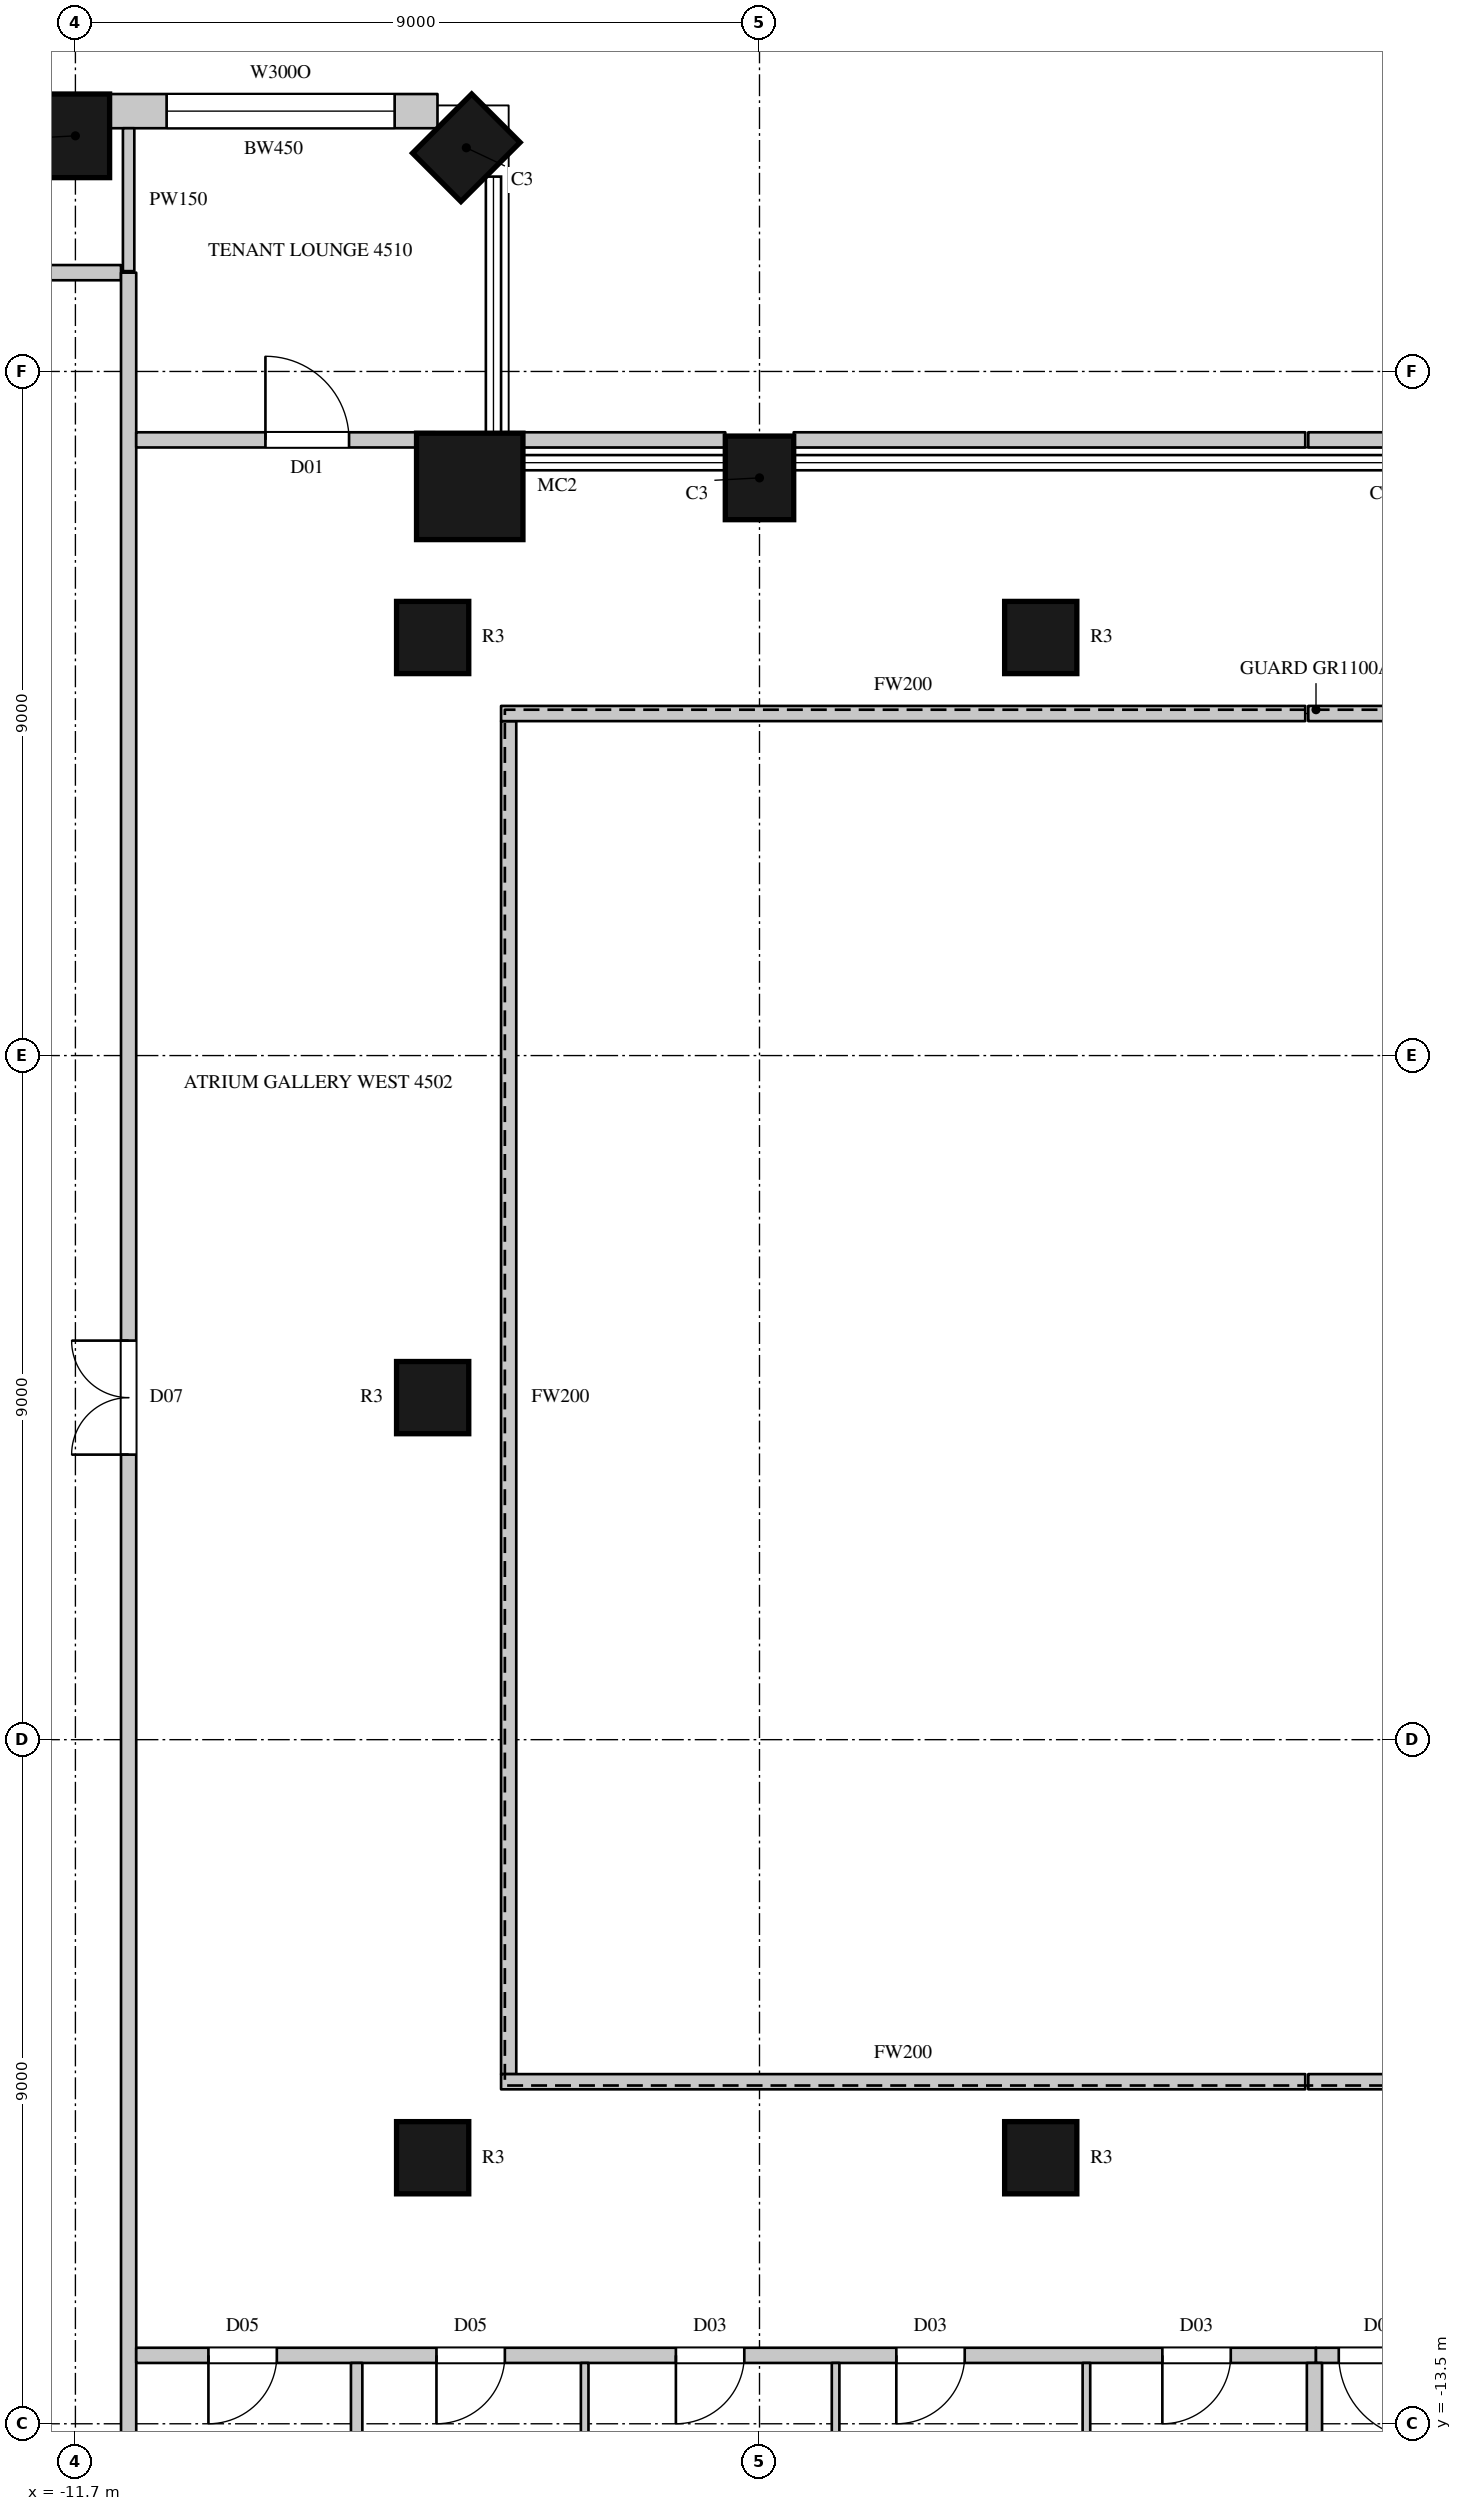
"""IFC4 building model, lengths in metres.
Left out: names, types, materials, properties, quantities, classifications, styles, units other than length and angle.
Written with IfcOpenShell. Run it as: python <this file> out.ifc"""

import sys

from ifc_helpers import new_model, si_unit, direction, frame, frame_2d, origin, origin_2d, place, context, subcontext, project, spatial, rectangle, circle, extrude, element, fill, save


model = new_model("IFC4")
c1 = context("Model", 3, precision=1e-05, world=origin(), true_north=direction((0.0, 1.0)))
c2 = subcontext(c1, "Body", "Model", "MODEL_VIEW")
j1 = project(units=[si_unit("LENGTHUNIT", "METRE"), si_unit("PLANEANGLEUNIT", "RADIAN")], contexts=[c1])
p1 = place(None, origin())
s1 = spatial("IfcSite", under=j1, at=p1, CompositionType="ELEMENT")
p2 = place(p1, origin())
s2 = spatial("IfcBuilding", under=s1, at=p2, CompositionType="ELEMENT")
p3 = place(p2, frame((0.0, 0.0, 205.6)))
s3 = spatial("IfcBuildingStorey", under=s2, at=p3, CompositionType="ELEMENT", Elevation=205.6)
p4 = place(p3, frame((-2.7, 12.1, 0.0), z_axis=(0.0, 0.0, 1.0), x_axis=(-1.0, 0.0, 0.0)))
e1 = element("IfcColumn", 1, at=p4, inside=s3, PredefinedType="COLUMN", context=c2, shape_type="SweptSolid", body=[
    extrude(rectangle(XDim=0.9, YDim=1.1, at=origin_2d()), origin(), (0.0, 0.0, 1.0), 4.1),
])
p5 = place(p3, frame((-6.512, 11.988, 0.0), z_axis=(0.0, 0.0, 1.0), x_axis=(1.0, 0.0, 0.0)))
e2 = element("IfcColumn", 2, at=p5, inside=s3, PredefinedType="COLUMN", context=c2, shape_type="SweptSolid", body=[
    extrude(circle(Radius=0.7, at=origin_2d()), origin(), (0.0, 0.0, 1.0), 4.1),
])
for number, where, z_axis, x_axis in (
    (3, (-6.557, 16.443, 0.0), (0.0, 0.0, 1.0), (-0.707, 0.707, 0.0)),
    (4, (-11.7, 16.6, 0.0), (0.0, 0.0, 1.0), (-1.0, 0.0, 0.0)),
):
    element("IfcColumn", number, at=place(p3, frame(where, z_axis=z_axis, x_axis=x_axis)), inside=s3, PredefinedType="COLUMN", context=c2, shape_type="SweptSolid", body=[
        extrude(rectangle(XDim=0.9, YDim=1.1, at=origin_2d()), origin(), (0.0, 0.0, 1.0), 4.1),
    ])
for number, where, z_axis, x_axis in (
    (5, (-7.0, -10.0, 0.0), (0.0, 0.0, 1.0), (1.0, 0.0, 0.0)),
    (6, (-7.0, 0.0, 0.0), (0.0, 0.0, 1.0), (1.0, 0.0, 0.0)),
    (7, (-7.0, 10.0, 0.0), (0.0, 0.0, 1.0), (1.0, 0.0, 0.0)),
    (8, (1.0, -10.0, 0.0), (0.0, 0.0, 1.0), (1.0, 0.0, 0.0)),
    (9, (1.0, 10.0, 0.0), (0.0, 0.0, 1.0), (1.0, 0.0, 0.0)),
):
    element("IfcColumn", number, at=place(p3, frame(where, z_axis=z_axis, x_axis=x_axis)), inside=s3, PredefinedType="COLUMN", context=c2, shape_type="SweptSolid", body=[
        extrude(circle(Radius=0.475, at=origin_2d()), origin(), (0.0, 0.0, 1.0), 4.1),
    ])
p6 = place(p3, frame((-6.936, 16.925, 0.0), z_axis=(0.0, 0.0, 1.0), x_axis=(-1.0, 0.0, 0.0)))
e10 = element("IfcWall", 10, at=p6, inside=s3, PredefinedType="SOLIDWALL", context=c2, shape_type="SweptSolid", body=[
    extrude(rectangle(XDim=4.314, YDim=0.45, at=frame_2d((2.157, 0.0))), origin(), (0.0, 0.0, 1.0), 3.8),
])
p7 = place(p6, frame((0.564, 0.0, 1.05)))
e11 = element("IfcOpeningElement", 11, at=p7, cuts=e10, PredefinedType="OPENING", context=c2, shape_type="SweptSolid", body=[
    extrude(rectangle(XDim=3.0, YDim=2.4, at=frame_2d((1.5, 1.2))), frame((0.0, 0.235, 0.0), z_axis=(0.0, -1.0, 0.0), x_axis=(1.0, 0.0, 0.0)), (0.0, 0.0, 1.0), 0.47),
])
p8 = place(p3, frame((-13.97, 14.8, 0.0), z_axis=(0.0, 0.0, 1.0), x_axis=(1.0, 0.0, 0.0)))
e12 = element("IfcWall", 12, at=p8, inside=s3, PredefinedType="PARTITIONING", context=c2, shape_type="SweptSolid", body=[
    extrude(rectangle(XDim=2.87, YDim=0.2, at=frame_2d((1.435, 0.0))), origin(), (0.0, 0.0, 1.0), 3.8),
])
p9 = place(p3, frame((-11.0, -14.8, 0.0), z_axis=(0.0, 0.0, 1.0), x_axis=(0.0, 1.0, 0.0)))
e13 = element("IfcWall", 13, at=p9, inside=s3, PredefinedType="PARTITIONING", context=c2, shape_type="SweptSolid", body=[
    extrude(rectangle(XDim=29.6, YDim=0.2, at=frame_2d((14.8, 0.0))), origin(), (0.0, 0.0, 1.0), 3.8),
])
p10 = place(p9, frame((14.05, 0.0, 0.0)))
e14 = element("IfcOpeningElement", 14, at=p10, cuts=e13, PredefinedType="OPENING", context=c2, shape_type="SweptSolid", body=[
    extrude(rectangle(XDim=1.5, YDim=2.4, at=frame_2d((0.75, 1.2))), frame((0.0, 0.11, 0.0), z_axis=(0.0, -1.0, 0.0), x_axis=(1.0, 0.0, 0.0)), (0.0, 0.0, 1.0), 0.22),
])
p11 = place(p3, frame((-10.9, -12.6, 0.0), z_axis=(0.0, 0.0, 1.0), x_axis=(1.0, 0.0, 0.0)))
e15 = element("IfcWall", 15, at=p11, inside=s3, PredefinedType="PARTITIONING", context=c2, shape_type="SweptSolid", body=[
    extrude(rectangle(XDim=15.521, YDim=0.2, at=frame_2d((7.76, 0.0))), origin(), (0.0, 0.0, 1.0), 3.8),
])
p12 = place(p11, frame((0.95, 0.0, 0.0)))
e16 = element("IfcOpeningElement", 16, at=p12, cuts=e15, PredefinedType="OPENING", context=c2, shape_type="SweptSolid", body=[
    extrude(rectangle(XDim=0.9, YDim=2.2, at=frame_2d((0.45, 1.1))), frame((0.0, 0.11, 0.0), z_axis=(0.0, -1.0, 0.0), x_axis=(1.0, 0.0, 0.0)), (0.0, 0.0, 1.0), 0.22),
])
p13 = place(p11, frame((3.95, 0.0, 0.0)))
e17 = element("IfcOpeningElement", 17, at=p13, cuts=e15, PredefinedType="OPENING", context=c2, shape_type="SweptSolid", body=[
    extrude(rectangle(XDim=0.9, YDim=2.2, at=frame_2d((0.45, 1.1))), frame((0.0, 0.11, 0.0), z_axis=(0.0, -1.0, 0.0), x_axis=(1.0, 0.0, 0.0)), (0.0, 0.0, 1.0), 0.22),
])
p14 = place(p11, frame((7.1, 0.0, 0.0)))
e18 = element("IfcOpeningElement", 18, at=p14, cuts=e15, PredefinedType="OPENING", context=c2, shape_type="SweptSolid", body=[
    extrude(rectangle(XDim=0.9, YDim=2.2, at=frame_2d((0.45, 1.1))), frame((0.0, 0.11, 0.0), z_axis=(0.0, -1.0, 0.0), x_axis=(1.0, 0.0, 0.0)), (0.0, 0.0, 1.0), 0.22),
])
p15 = place(p11, frame((10.0, 0.0, 0.0)))
e19 = element("IfcOpeningElement", 19, at=p15, cuts=e15, PredefinedType="OPENING", context=c2, shape_type="SweptSolid", body=[
    extrude(rectangle(XDim=0.9, YDim=2.2, at=frame_2d((0.45, 1.1))), frame((0.0, 0.11, 0.0), z_axis=(0.0, -1.0, 0.0), x_axis=(1.0, 0.0, 0.0)), (0.0, 0.0, 1.0), 0.22),
])
p16 = place(p11, frame((13.5, 0.0, 0.0)))
e20 = element("IfcOpeningElement", 20, at=p16, cuts=e15, PredefinedType="OPENING", context=c2, shape_type="SweptSolid", body=[
    extrude(rectangle(XDim=0.9, YDim=2.2, at=frame_2d((0.45, 1.1))), frame((0.0, 0.11, 0.0), z_axis=(0.0, -1.0, 0.0), x_axis=(1.0, 0.0, 0.0)), (0.0, 0.0, 1.0), 0.22),
])
p17 = place(p3, frame((-10.9, 12.6, 0.0), z_axis=(0.0, 0.0, 1.0), x_axis=(1.0, 0.0, 0.0)))
e21 = element("IfcWall", 21, at=p17, inside=s3, PredefinedType="PARTITIONING", context=c2, shape_type="SweptSolid", body=[
    extrude(rectangle(XDim=3.935, YDim=0.2, at=frame_2d((1.968, 0.0))), origin(), (0.0, 0.0, 1.0), 3.8),
])
p18 = place(p17, frame((1.7, 0.0, 0.0)))
e22 = element("IfcOpeningElement", 22, at=p18, cuts=e21, PredefinedType="OPENING", context=c2, shape_type="SweptSolid", body=[
    extrude(rectangle(XDim=1.1, YDim=2.4, at=frame_2d((0.55, 1.2))), frame((0.0, 0.11, 0.0), z_axis=(0.0, -1.0, 0.0), x_axis=(1.0, 0.0, 0.0)), (0.0, 0.0, 1.0), 0.22),
])
p19 = place(p3, frame((-6.06, 12.6, 0.0), z_axis=(0.0, 0.0, 1.0), x_axis=(1.0, 0.0, 0.0)))
e23 = element("IfcWall", 23, at=p19, inside=s3, PredefinedType="PARTITIONING", context=c2, shape_type="SweptSolid", body=[
    extrude(rectangle(XDim=2.91, YDim=0.2, at=frame_2d((1.455, 0.0))), origin(), (0.0, 0.0, 1.0), 3.8),
])
p20 = place(p3, frame((-2.25, 12.6, 0.0), z_axis=(0.0, 0.0, 1.0), x_axis=(1.0, 0.0, 0.0)))
e24 = element("IfcWall", 24, at=p20, inside=s3, PredefinedType="PARTITIONING", context=c2, shape_type="SweptSolid", body=[
    extrude(rectangle(XDim=6.73, YDim=0.2, at=frame_2d((3.365, 0.0))), origin(), (0.0, 0.0, 1.0), 3.8),
])
p21 = place(p3, frame((-6.0, -8.9, 0.0), z_axis=(0.0, 0.0, 1.0), x_axis=(0.0, 1.0, 0.0)))
e25 = element("IfcWall", 25, at=p21, inside=s3, PredefinedType="PARTITIONING", context=c2, shape_type="SweptSolid", body=[
    extrude(rectangle(XDim=17.8, YDim=0.2, at=frame_2d((8.9, 0.0))), origin(), (0.0, 0.0, 1.0), 3.8),
])
for number, where, z_axis, x_axis in (
    (26, (-6.1, -9.0, 0.0), (0.0, 0.0, 1.0), (1.0, 0.0, 0.0)),
    (27, (-6.1, 9.0, 0.0), (0.0, 0.0, 1.0), (1.0, 0.0, 0.0)),
):
    element("IfcWall", number, at=place(p3, frame(where, z_axis=z_axis, x_axis=x_axis)), inside=s3, PredefinedType="PARTITIONING", context=c2, shape_type="SweptSolid", body=[
        extrude(rectangle(XDim=10.58, YDim=0.2, at=frame_2d((5.29, 0.0))), origin(), (0.0, 0.0, 1.0), 3.8),
    ])
for number, where, z_axis, x_axis in (
    (28, (4.52, -9.0, 0.0), (0.0, 0.0, 1.0), (1.0, 0.0, 0.0)),
    (29, (4.52, 9.0, 0.0), (0.0, 0.0, 1.0), (1.0, 0.0, 0.0)),
):
    element("IfcWall", number, at=place(p3, frame(where, z_axis=z_axis, x_axis=x_axis)), inside=s3, PredefinedType="PARTITIONING", context=c2, shape_type="SweptSolid", body=[
        extrude(rectangle(XDim=3.58, YDim=0.2, at=frame_2d((1.79, 0.0))), origin(), (0.0, 0.0, 1.0), 3.8),
    ])
p22 = place(p3, frame((4.52, 12.6, 0.0), z_axis=(0.0, 0.0, 1.0), x_axis=(1.0, 0.0, 0.0)))
e30 = element("IfcWall", 30, at=p22, inside=s3, PredefinedType="PARTITIONING", context=c2, shape_type="SweptSolid", body=[
    extrude(rectangle(XDim=1.33, YDim=0.2, at=frame_2d((0.665, 0.0))), origin(), (0.0, 0.0, 1.0), 3.8),
])
p23 = place(p3, frame((-11.0, 14.82, 0.0), z_axis=(0.0, 0.0, 1.0), x_axis=(0.0, 1.0, 0.0)))
e31 = element("IfcWall", 31, at=p23, inside=s3, PredefinedType="PARTITIONING", context=c2, shape_type="SweptSolid", body=[
    extrude(rectangle(XDim=1.88, YDim=0.15, at=frame_2d((0.94, 0.0))), origin(), (0.0, 0.0, 1.0), 3.8),
])
p24 = place(p3, frame((-8.0, -16.7, 0.0), z_axis=(0.0, 0.0, 1.0), x_axis=(0.0, 1.0, 0.0)))
e32 = element("IfcWall", 32, at=p24, inside=s3, PredefinedType="PARTITIONING", context=c2, shape_type="SweptSolid", body=[
    extrude(rectangle(XDim=4.0, YDim=0.15, at=frame_2d((2.0, 0.0))), origin(), (0.0, 0.0, 1.0), 3.8),
])
p25 = place(p3, frame((4.621, -12.6, 0.0), z_axis=(0.0, 0.0, 1.0), x_axis=(1.0, 0.0, 0.0)))
e33 = element("IfcWall", 33, at=p25, inside=s3, PredefinedType="PARTITIONING", context=c2, shape_type="SweptSolid", body=[
    extrude(rectangle(XDim=1.659, YDim=0.2, at=frame_2d((0.83, 0.0))), origin(), (0.0, 0.0, 1.0), 3.8),
])
p26 = place(p25, frame((0.3, 0.0, 0.0)))
e34 = element("IfcOpeningElement", 34, at=p26, cuts=e33, PredefinedType="OPENING", context=c2, shape_type="SweptSolid", body=[
    extrude(rectangle(XDim=1.1, YDim=2.4, at=frame_2d((0.55, 1.2))), frame((0.0, 0.11, 0.0), z_axis=(0.0, -1.0, 0.0), x_axis=(1.0, 0.0, 0.0)), (0.0, 0.0, 1.0), 0.22),
])
p27 = place(p3, frame((4.601, -16.7, 0.0), z_axis=(0.0, 0.0, 1.0), x_axis=(0.0, 1.0, 0.0)))
e35 = element("IfcWall", 35, at=p27, inside=s3, PredefinedType="PARTITIONING", context=c2, shape_type="SweptSolid", body=[
    extrude(rectangle(XDim=4.0, YDim=0.2, at=frame_2d((2.0, 0.0))), origin(), (0.0, 0.0, 1.0), 3.8),
])
for number, where, z_axis, x_axis in (
    (36, (-5.0, -16.7, 0.0), (0.0, 0.0, 1.0), (0.0, 1.0, 0.0)),
    (37, (-1.699, -16.7, 0.0), (0.0, 0.0, 1.0), (0.0, 1.0, 0.0)),
):
    element("IfcWall", number, at=place(p3, frame(where, z_axis=z_axis, x_axis=x_axis)), inside=s3, PredefinedType="PARTITIONING", context=c2, shape_type="SweptSolid", body=[
        extrude(rectangle(XDim=4.0, YDim=0.1, at=frame_2d((2.0, 0.0))), origin(), (0.0, 0.0, 1.0), 3.8),
    ])
p28 = place(p3, frame((1.601, -16.7, 0.0), z_axis=(0.0, 0.0, 1.0), x_axis=(0.0, 1.0, 0.0)))
e38 = element("IfcWall", 38, at=p28, inside=s3, PredefinedType="PARTITIONING", context=c2, shape_type="SweptSolid", body=[
    extrude(rectangle(XDim=4.0, YDim=0.1, at=frame_2d((2.0, 0.0))), origin(), (0.0, 0.0, 1.0), 3.15),
])
p29 = place(p7, origin())
e39 = element("IfcWindow", 39, at=p29, inside=s3, PartitioningType="SINGLE_PANEL", PredefinedType="WINDOW", context=c2, shape_type="SweptSolid", body=[
    extrude(rectangle(XDim=3.0, YDim=2.4, at=frame_2d((1.5, 1.2))), frame((0.0, 0.135, 0.0), z_axis=(0.0, -1.0, 0.0), x_axis=(1.0, 0.0, 0.0)), (0.0, 0.0, 1.0), 0.06),
])
fill(e11, e39)
p30 = place(p10, origin())
e40 = element("IfcDoor", 40, at=p30, inside=s3, OperationType="DOUBLE_DOOR_SINGLE_SWING", PredefinedType="DOOR", context=c2, shape_type="SweptSolid", body=[
    extrude(rectangle(XDim=1.5, YDim=2.4, at=frame_2d((0.75, 1.2))), frame((0.0, 0.025, 0.0), z_axis=(0.0, -1.0, 0.0), x_axis=(1.0, 0.0, 0.0)), (0.0, 0.0, 1.0), 0.05),
])
fill(e14, e40)
p31 = place(p12, origin())
e41 = element("IfcDoor", 41, at=p31, inside=s3, OperationType="SINGLE_SWING_RIGHT", PredefinedType="DOOR", context=c2, shape_type="SweptSolid", body=[
    extrude(rectangle(XDim=0.9, YDim=2.2, at=frame_2d((0.45, 1.1))), frame((0.0, 0.025, 0.0), z_axis=(0.0, -1.0, 0.0), x_axis=(1.0, 0.0, 0.0)), (0.0, 0.0, 1.0), 0.05),
])
fill(e16, e41)
p32 = place(p13, origin())
e42 = element("IfcDoor", 42, at=p32, inside=s3, OperationType="SINGLE_SWING_RIGHT", PredefinedType="DOOR", context=c2, shape_type="SweptSolid", body=[
    extrude(rectangle(XDim=0.9, YDim=2.2, at=frame_2d((0.45, 1.1))), frame((0.0, 0.025, 0.0), z_axis=(0.0, -1.0, 0.0), x_axis=(1.0, 0.0, 0.0)), (0.0, 0.0, 1.0), 0.05),
])
fill(e17, e42)
p33 = place(p14, origin())
e43 = element("IfcDoor", 43, at=p33, inside=s3, OperationType="SINGLE_SWING_RIGHT", PredefinedType="DOOR", context=c2, shape_type="SweptSolid", body=[
    extrude(rectangle(XDim=0.9, YDim=2.2, at=frame_2d((0.45, 1.1))), frame((0.0, 0.025, 0.0), z_axis=(0.0, -1.0, 0.0), x_axis=(1.0, 0.0, 0.0)), (0.0, 0.0, 1.0), 0.05),
])
fill(e18, e43)
p34 = place(p15, origin())
e44 = element("IfcDoor", 44, at=p34, inside=s3, OperationType="SINGLE_SWING_RIGHT", PredefinedType="DOOR", context=c2, shape_type="SweptSolid", body=[
    extrude(rectangle(XDim=0.9, YDim=2.2, at=frame_2d((0.45, 1.1))), frame((0.0, 0.025, 0.0), z_axis=(0.0, -1.0, 0.0), x_axis=(1.0, 0.0, 0.0)), (0.0, 0.0, 1.0), 0.05),
])
fill(e19, e44)
p35 = place(p16, origin())
e45 = element("IfcDoor", 45, at=p35, inside=s3, OperationType="SINGLE_SWING_RIGHT", PredefinedType="DOOR", context=c2, shape_type="SweptSolid", body=[
    extrude(rectangle(XDim=0.9, YDim=2.2, at=frame_2d((0.45, 1.1))), frame((0.0, 0.025, 0.0), z_axis=(0.0, -1.0, 0.0), x_axis=(1.0, 0.0, 0.0)), (0.0, 0.0, 1.0), 0.05),
])
fill(e20, e45)
p36 = place(p18, origin())
e46 = element("IfcDoor", 46, at=p36, inside=s3, OperationType="SINGLE_SWING_LEFT", PredefinedType="DOOR", context=c2, shape_type="SweptSolid", body=[
    extrude(rectangle(XDim=1.1, YDim=2.4, at=frame_2d((0.55, 1.2))), frame((0.0, 0.025, 0.0), z_axis=(0.0, -1.0, 0.0), x_axis=(1.0, 0.0, 0.0)), (0.0, 0.0, 1.0), 0.05),
])
fill(e22, e46)
p37 = place(p26, origin())
e47 = element("IfcDoor", 47, at=p37, inside=s3, OperationType="SINGLE_SWING_LEFT", PredefinedType="DOOR", context=c2, shape_type="SweptSolid", body=[
    extrude(rectangle(XDim=1.1, YDim=2.4, at=frame_2d((0.55, 1.2))), frame((0.0, 0.025, 0.0), z_axis=(0.0, -1.0, 0.0), x_axis=(1.0, 0.0, 0.0)), (0.0, 0.0, 1.0), 0.05),
])
fill(e34, e47)
save(model, sys.argv[1])
